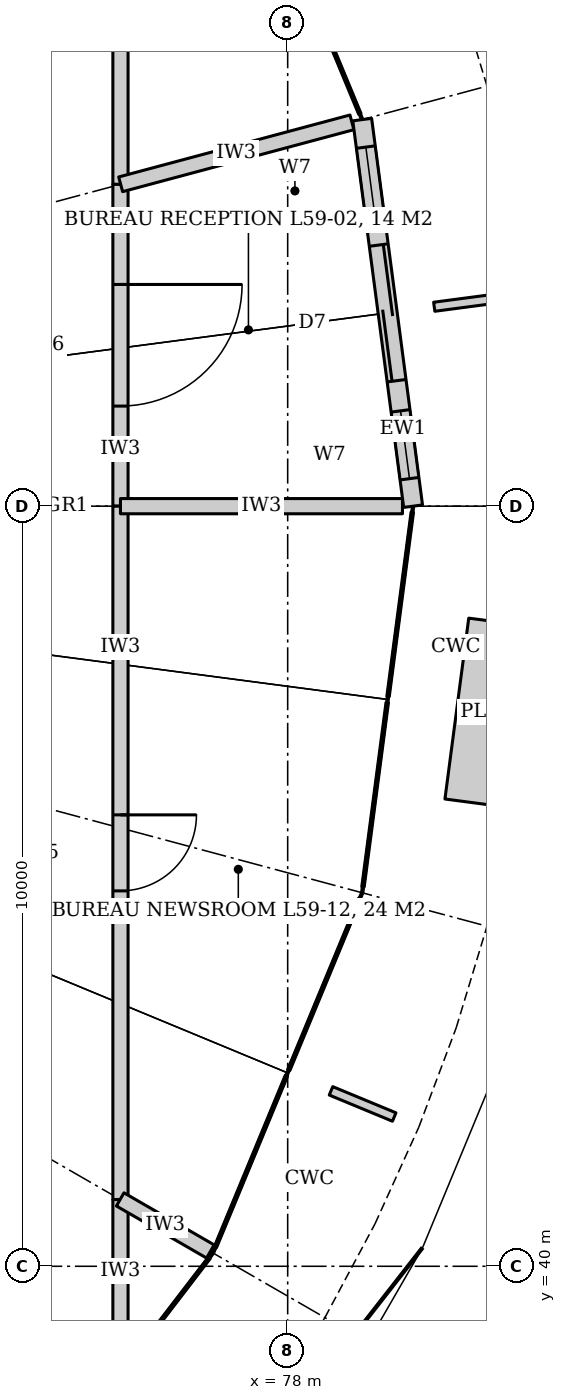
"""IFC4 building model, lengths in metres.
Left out: names, types, materials, properties, quantities, classifications, styles, units other than length and angle.
Written with IfcOpenShell. Run it as: python <this file> out.ifc"""

import sys

from ifc_helpers import new_model, si_unit, direction, frame, frame_2d, origin, place, context, subcontext, project, spatial, rectangle, extrude, element, fill, save


model = new_model("IFC4")
c1 = context("Model", 3, precision=1e-05, world=origin(), true_north=direction((0.0, 1.0)))
c2 = subcontext(c1, "Body", "Model", "MODEL_VIEW")
j1 = project(units=[si_unit("LENGTHUNIT", "METRE"), si_unit("PLANEANGLEUNIT", "RADIAN")], contexts=[c1])
p1 = place(None, origin())
s1 = spatial("IfcSite", under=j1, at=p1, CompositionType="ELEMENT")
p2 = place(p1, origin())
s2 = spatial("IfcBuilding", under=s1, at=p2, CompositionType="ELEMENT")
p3 = place(p2, frame((0.0, 0.0, 252.8)))
s3 = spatial("IfcBuildingStorey", under=s2, at=p3, CompositionType="ELEMENT", Elevation=252.8)
p4 = place(p3, frame((75.8, 58.8, 0.0), z_axis=(0.0, 0.0, 1.0), x_axis=(0.0, -1.0, 0.0)))
e1 = element("IfcWall", 1, at=p4, inside=s3, PredefinedType="PARTITIONING", context=c2, shape_type="SweptSolid", body=[
    extrude(rectangle(XDim=4.566, YDim=0.2, at=frame_2d((2.283, 0.0))), origin(), (0.0, 0.0, 1.0), 3.02),
])
p5 = place(p3, frame((75.8, 54.234, 0.0), z_axis=(0.0, 0.0, 1.0), x_axis=(0.0, -1.0, 0.0)))
e2 = element("IfcWall", 2, at=p5, inside=s3, PredefinedType="PARTITIONING", context=c2, shape_type="SweptSolid", body=[
    extrude(rectangle(XDim=4.234, YDim=0.2, at=frame_2d((2.117, 0.0))), origin(), (0.0, 0.0, 1.0), 3.02),
])
p6 = place(p5, frame((1.317, 0.0, 0.0)))
e3 = element("IfcOpeningElement", 3, at=p6, cuts=e2, PredefinedType="OPENING", context=c2, shape_type="SweptSolid", body=[
    extrude(rectangle(XDim=1.6, YDim=2.4, at=frame_2d((0.8, 1.2))), frame((0.0, 0.11, 0.0), z_axis=(0.0, -1.0, 0.0), x_axis=(1.0, 0.0, 0.0)), (0.0, 0.0, 1.0), 0.22),
])
p7 = place(p3, frame((75.8, 50.0, 0.0), z_axis=(0.0, 0.0, 1.0), x_axis=(0.0, -1.0, 0.0)))
e4 = element("IfcWall", 4, at=p7, inside=s3, PredefinedType="PARTITIONING", context=c2, shape_type="SweptSolid", body=[
    extrude(rectangle(XDim=9.122, YDim=0.2, at=frame_2d((4.561, 0.0))), origin(), (0.0, 0.0, 1.0), 3.02),
])
p8 = place(p7, frame((4.061, 0.0, 0.0)))
e5 = element("IfcOpeningElement", 5, at=p8, cuts=e4, PredefinedType="OPENING", context=c2, shape_type="SweptSolid", body=[
    extrude(rectangle(XDim=1.0, YDim=2.1, at=frame_2d((0.5, 1.05))), frame((0.0, 0.11, 0.0), z_axis=(0.0, -1.0, 0.0), x_axis=(1.0, 0.0, 0.0)), (0.0, 0.0, 1.0), 0.22),
])
p9 = place(p3, frame((75.8, 40.878, 0.0), z_axis=(0.0, 0.0, 1.0), x_axis=(0.0, -1.0, 0.0)))
e6 = element("IfcWall", 6, at=p9, inside=s3, PredefinedType="PARTITIONING", context=c2, shape_type="SweptSolid", body=[
    extrude(rectangle(XDim=1.878, YDim=0.2, at=frame_2d((0.939, 0.0))), origin(), (0.0, 0.0, 1.0), 3.02),
])
p10 = place(p3, frame((75.8, 50.0, 0.0), z_axis=(0.0, 0.0, 1.0), x_axis=(1.0, 0.0, 0.0)))
e7 = element("IfcWall", 7, at=p10, inside=s3, PredefinedType="PARTITIONING", context=c2, shape_type="SweptSolid", body=[
    extrude(rectangle(XDim=3.96, YDim=0.2, at=frame_2d((1.98, 0.0))), origin(), (0.0, 0.0, 1.0), 3.02),
])
p11 = place(p3, frame((75.802, 54.234, 0.0), z_axis=(0.0, 0.0, 1.0), x_axis=(0.965933949521, 0.258788726886, 0.0)))
e8 = element("IfcWall", 8, at=p11, inside=s3, PredefinedType="PARTITIONING", context=c2, shape_type="SweptSolid", body=[
    extrude(rectangle(XDim=3.4, YDim=0.2, at=frame_2d((1.7, 0.0))), origin(), (0.0, 0.0, 1.0), 3.02),
])
p12 = place(p3, frame((75.796, 40.88, 0.0), z_axis=(0.0, 0.0, 1.0), x_axis=(0.866055074793, -0.499948604784, 0.0)))
e9 = element("IfcWall", 9, at=p12, inside=s3, PredefinedType="PARTITIONING", context=c2, shape_type="SweptSolid", body=[
    extrude(rectangle(XDim=1.62, YDim=0.2, at=frame_2d((0.81, 0.0))), origin(), (0.0, 0.0, 1.0), 3.02),
])
p13 = place(p3, frame((79.9, 50.0, 0.0), z_axis=(0.0, 0.0, 1.0), x_axis=(-0.130510435174, 0.991446935701, 0.0)))
e10 = element("IfcWall", 10, at=p13, inside=s3, PredefinedType="SOLIDWALL", context=c2, shape_type="SweptSolid", body=[
    extrude(rectangle(XDim=5.195, YDim=0.25, at=frame_2d((2.597, 0.0))), origin(), (0.0, 0.0, 1.0), 4.04),
])
p14 = place(p13, frame((1.698, 0.0, 0.0)))
e11 = element("IfcOpeningElement", 11, at=p14, cuts=e10, PredefinedType="OPENING", context=c2, shape_type="SweptSolid", body=[
    extrude(rectangle(XDim=1.8, YDim=2.4, at=frame_2d((0.9, 1.2))), frame((0.0, 0.135, 0.0), z_axis=(0.0, -1.0, 0.0), x_axis=(1.0, 0.0, 0.0)), (0.0, 0.0, 1.0), 0.27),
])
p15 = place(p13, frame((0.397, 0.0, 0.0)))
e12 = element("IfcOpeningElement", 12, at=p15, cuts=e10, PredefinedType="OPENING", context=c2, shape_type="SweptSolid", body=[
    extrude(rectangle(XDim=0.9, YDim=2.4, at=frame_2d((0.45, 1.2))), frame((0.0, 0.135, 0.0), z_axis=(0.0, -1.0, 0.0), x_axis=(1.0, 0.0, 0.0)), (0.0, 0.0, 1.0), 0.27),
])
p16 = place(p13, frame((3.897, 0.0, 0.0)))
e13 = element("IfcOpeningElement", 13, at=p16, cuts=e10, PredefinedType="OPENING", context=c2, shape_type="SweptSolid", body=[
    extrude(rectangle(XDim=0.9, YDim=2.4, at=frame_2d((0.45, 1.2))), frame((0.0, 0.135, 0.0), z_axis=(0.0, -1.0, 0.0), x_axis=(1.0, 0.0, 0.0)), (0.0, 0.0, 1.0), 0.27),
])
p17 = place(p6, origin())
e14 = element("IfcDoor", 14, at=p17, inside=s3, OperationType="DOUBLE_DOOR_DOUBLE_SWING", PredefinedType="DOOR", context=c2, shape_type="SweptSolid", body=[
    extrude(rectangle(XDim=1.6, YDim=2.4, at=frame_2d((0.8, 1.2))), frame((0.0, 0.025, 0.0), z_axis=(0.0, -1.0, 0.0), x_axis=(1.0, 0.0, 0.0)), (0.0, 0.0, 1.0), 0.05),
])
fill(e3, e14)
p18 = place(p8, origin())
e15 = element("IfcDoor", 15, at=p18, inside=s3, OperationType="SINGLE_SWING_LEFT", PredefinedType="DOOR", context=c2, shape_type="SweptSolid", body=[
    extrude(rectangle(XDim=1.0, YDim=2.1, at=frame_2d((0.5, 1.05))), frame((0.0, 0.025, 0.0), z_axis=(0.0, -1.0, 0.0), x_axis=(1.0, 0.0, 0.0)), (0.0, 0.0, 1.0), 0.05),
])
fill(e5, e15)
p19 = place(p14, origin())
e16 = element("IfcDoor", 16, at=p19, inside=s3, OperationType="DOUBLE_DOOR_SLIDING", PredefinedType="DOOR", context=c2, shape_type="SweptSolid", body=[
    extrude(rectangle(XDim=1.8, YDim=2.4, at=frame_2d((0.9, 1.2))), frame((0.0, 0.025, 0.0), z_axis=(0.0, -1.0, 0.0), x_axis=(1.0, 0.0, 0.0)), (0.0, 0.0, 1.0), 0.05),
])
fill(e11, e16)
p20 = place(p15, origin())
e17 = element("IfcWindow", 17, at=p20, inside=s3, PartitioningType="SINGLE_PANEL", PredefinedType="WINDOW", context=c2, shape_type="SweptSolid", body=[
    extrude(rectangle(XDim=0.9, YDim=2.4, at=frame_2d((0.45, 1.2))), frame((0.0, 0.03, 0.0), z_axis=(0.0, -1.0, 0.0), x_axis=(1.0, 0.0, 0.0)), (0.0, 0.0, 1.0), 0.06),
])
fill(e12, e17)
p21 = place(p16, origin())
e18 = element("IfcWindow", 18, at=p21, inside=s3, PartitioningType="SINGLE_PANEL", PredefinedType="WINDOW", context=c2, shape_type="SweptSolid", body=[
    extrude(rectangle(XDim=0.9, YDim=2.4, at=frame_2d((0.45, 1.2))), frame((0.0, 0.03, 0.0), z_axis=(0.0, -1.0, 0.0), x_axis=(1.0, 0.0, 0.0)), (0.0, 0.0, 1.0), 0.06),
])
fill(e13, e18)
save(model, sys.argv[1])
